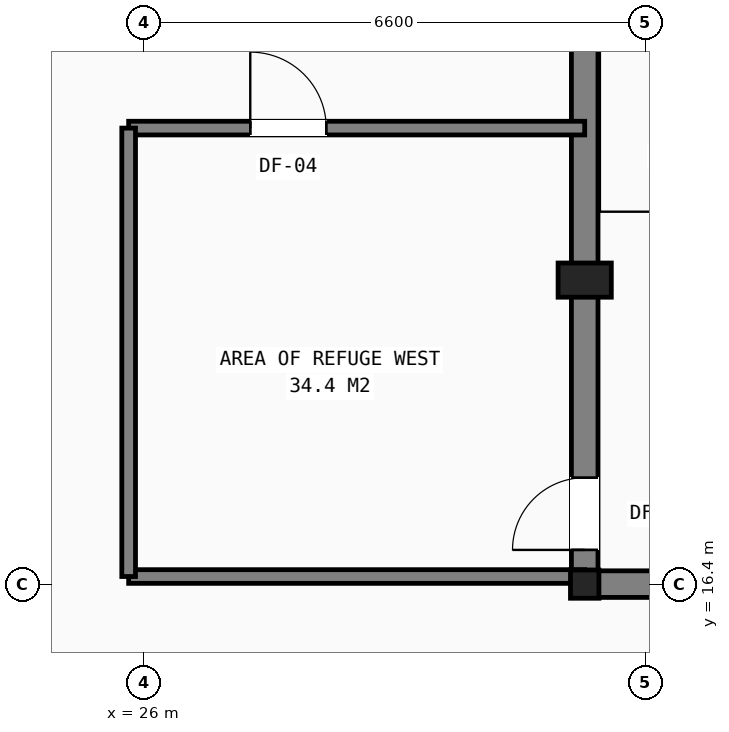
"""IFC4 building model, lengths in metres.
Left out: names, types, materials, properties, quantities, classifications, styles, units other than length and angle.
Written with IfcOpenShell. Run it as: python <this file> out.ifc"""

import sys

from ifc_helpers import new_model, si_unit, direction, frame, frame_2d, origin, origin_2d, place, context, subcontext, project, spatial, rectangle, i_section, extrude, element, fill, save


model = new_model("IFC4")
c1 = context("Model", 3, precision=1e-05, world=origin(), true_north=direction((0.0, 1.0)))
c2 = subcontext(c1, "Body", "Model", "MODEL_VIEW")
j1 = project(units=[si_unit("LENGTHUNIT", "METRE"), si_unit("PLANEANGLEUNIT", "RADIAN")], contexts=[c1])
p1 = place(None, origin())
s1 = spatial("IfcSite", under=j1, at=p1, CompositionType="ELEMENT")
p2 = place(p1, origin())
s2 = spatial("IfcBuilding", under=s1, at=p2, CompositionType="ELEMENT")
p3 = place(p2, frame((0.0, 0.0, 157.4)))
s3 = spatial("IfcBuildingStorey", under=s2, at=p3, CompositionType="ELEMENT", Elevation=157.4)
p4 = place(p3, frame((31.8, 16.4, 0.0), z_axis=(0.0, 0.0, 1.0), x_axis=(1.0, 0.0, 0.0)))
e1 = element("IfcColumn", 1, at=p4, inside=s3, PredefinedType="COLUMN", context=c2, shape_type="SweptSolid", body=[
    extrude(i_section(OverallWidth=0.374, OverallDepth=0.372, WebThickness=0.016, FlangeThickness=0.026, at=origin_2d()), origin(), (0.0, 0.0, 1.0), 4.6),
])
p5 = place(p3, frame((31.8, 20.4, 0.0), z_axis=(0.0, 0.0, 1.0), x_axis=(1.0, 0.0, 0.0)))
e2 = element("IfcColumn", 2, at=p5, inside=s3, PredefinedType="PILASTER", context=c2, shape_type="SweptSolid", body=[
    extrude(rectangle(XDim=0.7, YDim=0.45, at=origin_2d()), origin(), (0.0, 0.0, 1.0), 4.6),
])
p6 = place(p3, frame((31.8, 16.4, 0.0), z_axis=(0.0, 0.0, 1.0), x_axis=(1.0, 0.0, 0.0)))
e3 = element("IfcWall", 3, at=p6, inside=s3, PredefinedType="SHEAR", context=c2, shape_type="SweptSolid", body=[
    extrude(rectangle(XDim=16.4, YDim=0.35, at=frame_2d((8.2, 0.0))), origin(), (0.0, 0.0, 1.0), 4.36),
])
p7 = place(p6, frame((7.75, 0.0, 0.0)))
e4 = element("IfcOpeningElement", 4, at=p7, cuts=e3, PredefinedType="OPENING", context=c2, shape_type="SweptSolid", body=[
    extrude(rectangle(XDim=0.9, YDim=2.1, at=frame_2d((0.45, 1.05))), frame((0.0, 0.185, 0.0), z_axis=(0.0, -1.0, 0.0), x_axis=(1.0, 0.0, 0.0)), (0.0, 0.0, 1.0), 0.37),
])
p8 = place(p6, frame((4.2, 0.0, 0.0)))
e5 = element("IfcOpeningElement", 5, at=p8, cuts=e3, PredefinedType="OPENING", context=c2, shape_type="SweptSolid", body=[
    extrude(rectangle(XDim=0.95, YDim=2.1, at=frame_2d((0.475, 1.05))), frame((0.0, 0.185, 0.0), z_axis=(0.0, -1.0, 0.0), x_axis=(1.0, 0.0, 0.0)), (0.0, 0.0, 1.0), 0.37),
])
p9 = place(p6, frame((10.6, 0.0, 0.0)))
e6 = element("IfcOpeningElement", 6, at=p9, cuts=e3, PredefinedType="OPENING", context=c2, shape_type="SweptSolid", body=[
    extrude(rectangle(XDim=0.95, YDim=2.1, at=frame_2d((0.475, 1.05))), frame((0.0, 0.185, 0.0), z_axis=(0.0, -1.0, 0.0), x_axis=(1.0, 0.0, 0.0)), (0.0, 0.0, 1.0), 0.37),
])
p10 = place(p3, frame((31.8, 16.4, 0.0), z_axis=(0.0, 0.0, 1.0), x_axis=(0.0, 1.0, 0.0)))
e7 = element("IfcWall", 7, at=p10, inside=s3, PredefinedType="SHEAR", context=c2, shape_type="SweptSolid", body=[
    extrude(rectangle(XDim=14.8, YDim=0.35, at=frame_2d((7.4, 0.0))), origin(), (0.0, 0.0, 1.0), 4.36),
])
p11 = place(p10, frame((11.0, 0.0, 0.0)))
e8 = element("IfcOpeningElement", 8, at=p11, cuts=e7, PredefinedType="OPENING", context=c2, shape_type="SweptSolid", body=[
    extrude(rectangle(XDim=1.1, YDim=2.15, at=frame_2d((0.55, 1.075))), frame((0.0, 0.185, 0.0), z_axis=(0.0, -1.0, 0.0), x_axis=(1.0, 0.0, 0.0)), (0.0, 0.0, 1.0), 0.37),
])
p12 = place(p10, frame((0.45, 0.0, 0.0)))
e9 = element("IfcOpeningElement", 9, at=p12, cuts=e7, PredefinedType="OPENING", context=c2, shape_type="SweptSolid", body=[
    extrude(rectangle(XDim=0.95, YDim=2.1, at=frame_2d((0.475, 1.05))), frame((0.0, 0.185, 0.0), z_axis=(0.0, -1.0, 0.0), x_axis=(1.0, 0.0, 0.0)), (0.0, 0.0, 1.0), 0.37),
])
p13 = place(p3, frame((25.8, 16.5, 0.0), z_axis=(0.0, 0.0, 1.0), x_axis=(1.0, 0.0, 0.0)))
e10 = element("IfcWall", 10, at=p13, inside=s3, PredefinedType="PARTITIONING", context=c2, shape_type="SweptSolid", body=[
    extrude(rectangle(XDim=6.0, YDim=0.18, at=frame_2d((3.0, 0.0))), origin(), (0.0, 0.0, 1.0), 3.375),
])
p14 = place(p3, frame((25.8, 22.4, 0.0), z_axis=(0.0, 0.0, 1.0), x_axis=(1.0, 0.0, 0.0)))
e11 = element("IfcWall", 11, at=p14, inside=s3, PredefinedType="PARTITIONING", context=c2, shape_type="SweptSolid", body=[
    extrude(rectangle(XDim=6.0, YDim=0.18, at=frame_2d((3.0, 0.0))), origin(), (0.0, 0.0, 1.0), 3.811),
])
p15 = place(p14, frame((1.6, 0.0, 0.0)))
e12 = element("IfcOpeningElement", 12, at=p15, cuts=e11, PredefinedType="OPENING", context=c2, shape_type="SweptSolid", body=[
    extrude(rectangle(XDim=1.0, YDim=2.15, at=frame_2d((0.5, 1.075))), frame((0.0, 0.1, 0.0), z_axis=(0.0, -1.0, 0.0), x_axis=(1.0, 0.0, 0.0)), (0.0, 0.0, 1.0), 0.2),
])
p16 = place(p3, frame((25.8, 16.5, 0.0), z_axis=(0.0, 0.0, 1.0), x_axis=(0.0, 1.0, 0.0)))
e13 = element("IfcWall", 13, at=p16, inside=s3, PredefinedType="PARTITIONING", context=c2, shape_type="SweptSolid", body=[
    extrude(rectangle(XDim=5.9, YDim=0.18, at=frame_2d((2.95, 0.0))), origin(), (0.0, 0.0, 1.0), 4.36),
])
p17 = place(p12, origin())
e14 = element("IfcDoor", 14, at=p17, inside=s3, OperationType="SINGLE_SWING_LEFT", PredefinedType="DOOR", context=c2, shape_type="SweptSolid", body=[
    extrude(rectangle(XDim=0.95, YDim=2.1, at=frame_2d((0.475, 1.05))), frame((0.0, 0.025, 0.0), z_axis=(0.0, -1.0, 0.0), x_axis=(1.0, 0.0, 0.0)), (0.0, 0.0, 1.0), 0.05),
])
fill(e9, e14)
p18 = place(p15, origin())
e15 = element("IfcDoor", 15, at=p18, inside=s3, OperationType="SINGLE_SWING_LEFT", PredefinedType="DOOR", context=c2, shape_type="SweptSolid", body=[
    extrude(rectangle(XDim=1.0, YDim=2.15, at=frame_2d((0.5, 1.075))), frame((0.0, 0.025, 0.0), z_axis=(0.0, -1.0, 0.0), x_axis=(1.0, 0.0, 0.0)), (0.0, 0.0, 1.0), 0.05),
])
fill(e12, e15)
save(model, sys.argv[1])
